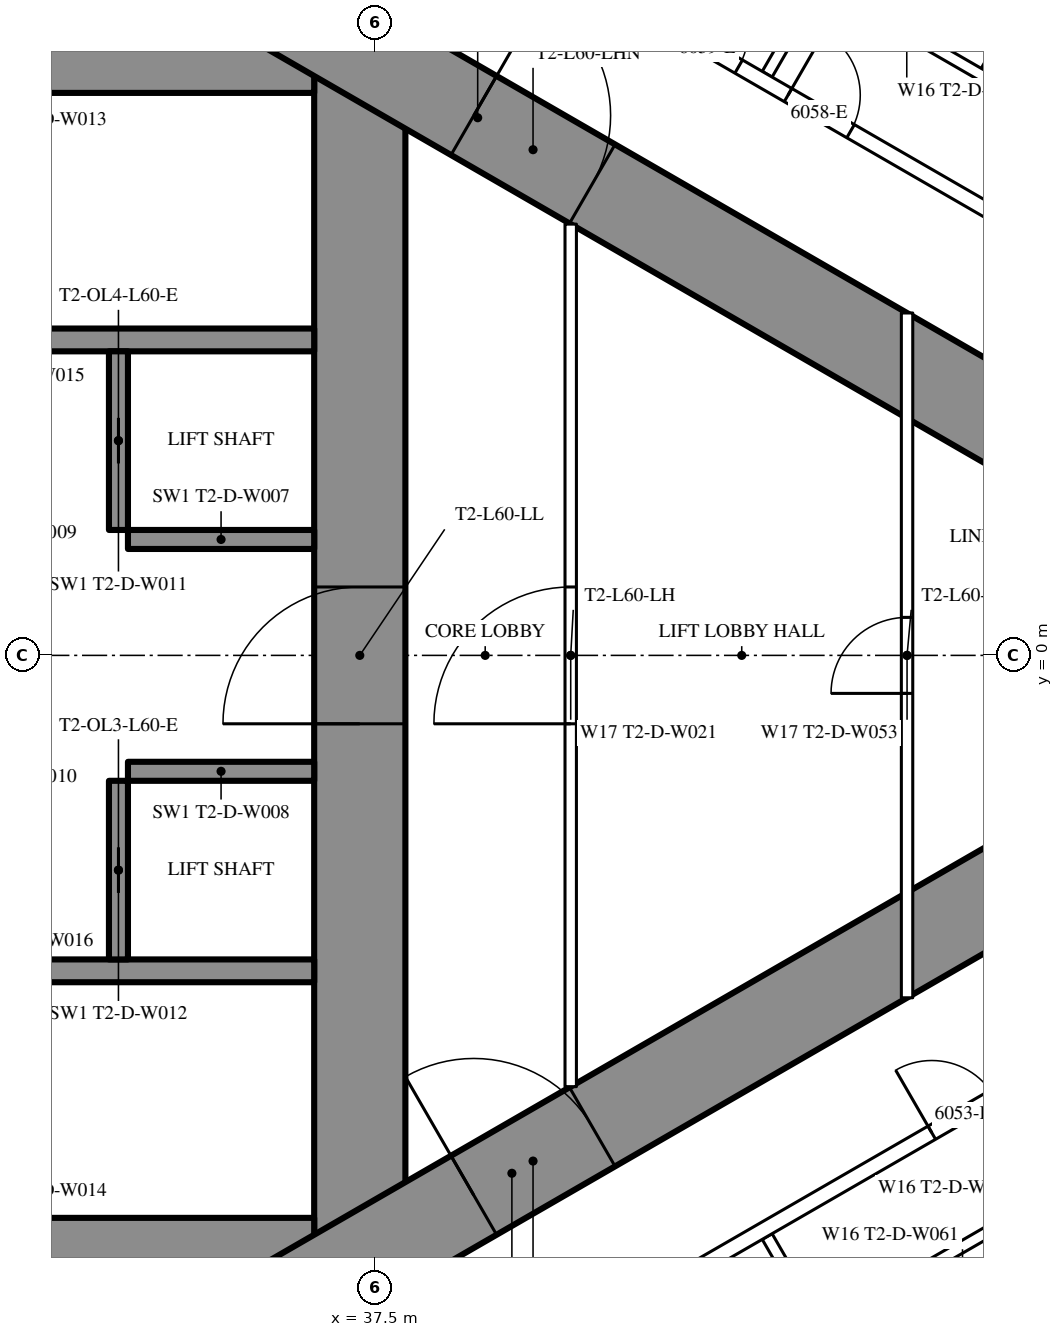
"""IFC4 building model, lengths in metres.
Left out: names, types, materials, properties, quantities, classifications, styles, units other than length and angle.
Written with IfcOpenShell. Run it as: python <this file> out.ifc"""

import sys

from ifc_helpers import new_model, si_unit, direction, frame, frame_2d, origin, place, context, subcontext, project, spatial, rectangle, extrude, element, fill, save


model = new_model("IFC4")
c1 = context("Model", 3, precision=1e-05, world=origin(), true_north=direction((0.0, 1.0)))
c2 = subcontext(c1, "Body", "Model", "MODEL_VIEW")
j1 = project(units=[si_unit("LENGTHUNIT", "METRE"), si_unit("PLANEANGLEUNIT", "RADIAN")], contexts=[c1])
p1 = place(None, origin())
s1 = spatial("IfcSite", under=j1, at=p1, CompositionType="ELEMENT")
p2 = place(p1, origin())
s2 = spatial("IfcBuilding", under=s1, at=p2, CompositionType="ELEMENT")
p3 = place(p2, frame((0.0, 0.0, 226.1)))
s3 = spatial("IfcBuildingStorey", under=s2, at=p3, CompositionType="ELEMENT", Elevation=226.1)
p4 = place(p3, frame((37.3, -8.6, 0.0), z_axis=(0.0, 0.0, 1.0), x_axis=(0.0, 1.0, 0.0)))
e1 = element("IfcWall", 1, at=p4, inside=s3, PredefinedType="SHEAR", context=c2, shape_type="SweptSolid", body=[
    extrude(rectangle(XDim=17.2, YDim=1.2, at=frame_2d((8.6, 0.0))), origin(), (0.0, 0.0, 1.0), 3.6),
])
p5 = place(p4, frame((7.7, 0.0, 0.0)))
e2 = element("IfcOpeningElement", 2, at=p5, cuts=e1, PredefinedType="OPENING", context=c2, shape_type="SweptSolid", body=[
    extrude(rectangle(XDim=1.8, YDim=2.2, at=frame_2d((0.9, 1.1))), frame((0.0, 0.61, 0.0), z_axis=(0.0, -1.0, 0.0), x_axis=(1.0, 0.0, 0.0)), (0.0, 0.0, 1.0), 1.22),
])
p6 = place(p3, frame((28.3, -8.0, 0.0), z_axis=(0.0, 0.0, 1.0), x_axis=(1.0, 0.0, 0.0)))
e3 = element("IfcWall", 3, at=p6, inside=s3, PredefinedType="SHEAR", context=c2, shape_type="SweptSolid", body=[
    extrude(rectangle(XDim=8.4, YDim=1.2, at=frame_2d((4.2, 0.0))), origin(), (0.0, 0.0, 1.0), 3.6),
])
p7 = place(p6, frame((0.25, 0.0, 0.0)))
e4 = element("IfcOpeningElement", 4, at=p7, cuts=e3, PredefinedType="OPENING", context=c2, shape_type="SweptSolid", body=[
    extrude(rectangle(XDim=1.0, YDim=2.2, at=frame_2d((0.5, 1.1))), frame((0.0, 0.61, 0.0), z_axis=(0.0, -1.0, 0.0), x_axis=(1.0, 0.0, 0.0)), (0.0, 0.0, 1.0), 1.22),
])
p8 = place(p3, frame((28.3, 8.0, 0.0), z_axis=(0.0, 0.0, 1.0), x_axis=(1.0, 0.0, 0.0)))
e5 = element("IfcWall", 5, at=p8, inside=s3, PredefinedType="SHEAR", context=c2, shape_type="SweptSolid", body=[
    extrude(rectangle(XDim=8.4, YDim=1.2, at=frame_2d((4.2, 0.0))), origin(), (0.0, 0.0, 1.0), 3.6),
])
p9 = place(p8, frame((0.25, 0.0, 0.0)))
e6 = element("IfcOpeningElement", 6, at=p9, cuts=e5, PredefinedType="OPENING", context=c2, shape_type="SweptSolid", body=[
    extrude(rectangle(XDim=1.0, YDim=2.2, at=frame_2d((0.5, 1.1))), frame((0.0, 0.61, 0.0), z_axis=(0.0, -1.0, 0.0), x_axis=(1.0, 0.0, 0.0)), (0.0, 0.0, 1.0), 1.22),
])
for number, where, z_axis, x_axis in (
    (7, (28.3, -4.15, 0.0), (0.0, 0.0, 1.0), (1.0, 0.0, 0.0)),
    (8, (28.3, 4.15, 0.0), (0.0, 0.0, 1.0), (1.0, 0.0, 0.0)),
):
    element("IfcWall", number, at=place(p3, frame(where, z_axis=z_axis, x_axis=x_axis)), inside=s3, PredefinedType="SHEAR", context=c2, shape_type="SweptSolid", body=[
        extrude(rectangle(XDim=8.4, YDim=0.3, at=frame_2d((4.2, 0.0))), origin(), (0.0, 0.0, 1.0), 3.6),
    ])
p10 = place(p3, frame((34.125, -4.0, 0.0), z_axis=(0.0, 0.0, 1.0), x_axis=(0.0, 1.0, 0.0)))
e9 = element("IfcWall", 9, at=p10, inside=s3, PredefinedType="SHEAR", context=c2, shape_type="SweptSolid", body=[
    extrude(rectangle(XDim=2.35, YDim=0.25, at=frame_2d((1.175, 0.0))), origin(), (0.0, 0.0, 1.0), 3.6),
])
p11 = place(p10, frame((0.875, 0.0, 0.0)))
e10 = element("IfcOpeningElement", 10, at=p11, cuts=e9, PredefinedType="OPENING", context=c2, shape_type="SweptSolid", body=[
    extrude(rectangle(XDim=0.6, YDim=2.0, at=frame_2d((0.3, 1.0))), frame((0.0, 0.135, 0.0), z_axis=(0.0, -1.0, 0.0), x_axis=(1.0, 0.0, 0.0)), (0.0, 0.0, 1.0), 0.27),
])
p12 = place(p3, frame((34.25, -1.525, 0.0), z_axis=(0.0, 0.0, 1.0), x_axis=(1.0, 0.0, 0.0)))
e11 = element("IfcWall", 11, at=p12, inside=s3, PredefinedType="SHEAR", context=c2, shape_type="SweptSolid", body=[
    extrude(rectangle(XDim=2.45, YDim=0.25, at=frame_2d((1.225, 0.0))), origin(), (0.0, 0.0, 1.0), 3.6),
])
p13 = place(p3, frame((34.125, 1.65, 0.0), z_axis=(0.0, 0.0, 1.0), x_axis=(0.0, 1.0, 0.0)))
e12 = element("IfcWall", 12, at=p13, inside=s3, PredefinedType="SHEAR", context=c2, shape_type="SweptSolid", body=[
    extrude(rectangle(XDim=2.35, YDim=0.25, at=frame_2d((1.175, 0.0))), origin(), (0.0, 0.0, 1.0), 3.6),
])
p14 = place(p13, frame((0.875, 0.0, 0.0)))
e13 = element("IfcOpeningElement", 13, at=p14, cuts=e12, PredefinedType="OPENING", context=c2, shape_type="SweptSolid", body=[
    extrude(rectangle(XDim=0.6, YDim=2.0, at=frame_2d((0.3, 1.0))), frame((0.0, 0.135, 0.0), z_axis=(0.0, -1.0, 0.0), x_axis=(1.0, 0.0, 0.0)), (0.0, 0.0, 1.0), 0.27),
])
p15 = place(p3, frame((34.25, 1.525, 0.0), z_axis=(0.0, 0.0, 1.0), x_axis=(1.0, 0.0, 0.0)))
e14 = element("IfcWall", 14, at=p15, inside=s3, PredefinedType="SHEAR", context=c2, shape_type="SweptSolid", body=[
    extrude(rectangle(XDim=2.45, YDim=0.25, at=frame_2d((1.225, 0.0))), origin(), (0.0, 0.0, 1.0), 3.6),
])
p16 = place(p3, frame((27.2, -13.8, 0.0), z_axis=(0.0, 0.0, 1.0), x_axis=(0.866027159892, 0.499996958321, 0.0)))
e15 = element("IfcWall", 15, at=p16, inside=s3, PredefinedType="SHEAR", context=c2, shape_type="SweptSolid", body=[
    extrude(rectangle(XDim=27.947, YDim=1.2, at=frame_2d((13.973, 0.0))), origin(), (0.0, 0.0, 1.0), 3.6),
])
p17 = place(p16, frame((4.6, 0.0, 0.0)))
e16 = element("IfcOpeningElement", 16, at=p17, cuts=e15, PredefinedType="OPENING", context=c2, shape_type="SweptSolid", body=[
    extrude(rectangle(XDim=1.0, YDim=2.2, at=frame_2d((0.5, 1.1))), frame((0.0, 0.61, 0.0), z_axis=(0.0, -1.0, 0.0), x_axis=(1.0, 0.0, 0.0)), (0.0, 0.0, 1.0), 1.22),
])
p18 = place(p16, frame((13.395, 0.0, 0.0)))
e17 = element("IfcOpeningElement", 17, at=p18, cuts=e15, PredefinedType="OPENING", context=c2, shape_type="SweptSolid", body=[
    extrude(rectangle(XDim=1.8, YDim=2.2, at=frame_2d((0.9, 1.1))), frame((0.0, 0.61, 0.0), z_axis=(0.0, -1.0, 0.0), x_axis=(1.0, 0.0, 0.0)), (0.0, 0.0, 1.0), 1.22),
])
p19 = place(p3, frame((27.2, 13.8, 0.0), z_axis=(0.0, 0.0, 1.0), x_axis=(0.866024515034, -0.500001539357, 0.0)))
e18 = element("IfcWall", 18, at=p19, inside=s3, PredefinedType="SHEAR", context=c2, shape_type="SweptSolid", body=[
    extrude(rectangle(XDim=26.907, YDim=1.2, at=frame_2d((13.454, 0.0))), origin(), (0.0, 0.0, 1.0), 3.6),
])
p20 = place(p19, frame((4.6, 0.0, 0.0)))
e19 = element("IfcOpeningElement", 19, at=p20, cuts=e18, PredefinedType="OPENING", context=c2, shape_type="SweptSolid", body=[
    extrude(rectangle(XDim=1.0, YDim=2.2, at=frame_2d((0.5, 1.1))), frame((0.0, 0.61, 0.0), z_axis=(0.0, -1.0, 0.0), x_axis=(1.0, 0.0, 0.0)), (0.0, 0.0, 1.0), 1.22),
])
p21 = place(p19, frame((13.395, 0.0, 0.0)))
e20 = element("IfcOpeningElement", 20, at=p21, cuts=e18, PredefinedType="OPENING", context=c2, shape_type="SweptSolid", body=[
    extrude(rectangle(XDim=1.8, YDim=2.2, at=frame_2d((0.9, 1.1))), frame((0.0, 0.61, 0.0), z_axis=(0.0, -1.0, 0.0), x_axis=(1.0, 0.0, 0.0)), (0.0, 0.0, 1.0), 1.22),
])
for number, where, z_axis, x_axis in (
    (21, (42.66, -7.646, 0.0), (0.0, 0.0, 1.0), (0.5, -0.866, 0.0)),
    (22, (42.66, 7.646, 0.0), (0.0, 0.0, 1.0), (0.5, 0.866, 0.0)),
):
    element("IfcWall", number, at=place(p3, frame(where, z_axis=z_axis, x_axis=x_axis)), inside=s3, PredefinedType="PARTITIONING", context=c2, shape_type="SweptSolid", body=[
        extrude(rectangle(XDim=6.398, YDim=0.15, at=frame_2d((3.199, 0.0))), origin(), (0.0, 0.0, 1.0), 2.45),
    ])
p22 = place(p3, frame((28.959, 15.44, 0.0), z_axis=(0.0, 0.0, 1.0), x_axis=(0.866028936079, -0.499993881836, 0.0)))
e23 = element("IfcWall", 23, at=p22, inside=s3, PredefinedType="PARTITIONING", context=c2, shape_type="SweptSolid", body=[
    extrude(rectangle(XDim=20.503, YDim=0.2, at=frame_2d((10.251, 0.0))), origin(), (0.0, 0.0, 1.0), 3.35),
])
p23 = place(p22, frame((16.137, 0.0, 0.0)))
e24 = element("IfcOpeningElement", 24, at=p23, cuts=e23, PredefinedType="OPENING", context=c2, shape_type="SweptSolid", body=[
    extrude(rectangle(XDim=0.95, YDim=2.2, at=frame_2d((0.475, 1.1))), frame((0.0, 0.11, 0.0), z_axis=(0.0, -1.0, 0.0), x_axis=(1.0, 0.0, 0.0)), (0.0, 0.0, 1.0), 0.22),
])
p24 = place(p22, frame((14.437, 0.0, 0.0)))
e25 = element("IfcOpeningElement", 25, at=p24, cuts=e23, PredefinedType="OPENING", context=c2, shape_type="SweptSolid", body=[
    extrude(rectangle(XDim=0.95, YDim=2.2, at=frame_2d((0.475, 1.1))), frame((0.0, 0.11, 0.0), z_axis=(0.0, -1.0, 0.0), x_axis=(1.0, 0.0, 0.0)), (0.0, 0.0, 1.0), 0.22),
])
p25 = place(p22, frame((2.244, 0.0, 0.0)))
e26 = element("IfcOpeningElement", 26, at=p25, cuts=e23, PredefinedType="OPENING", context=c2, shape_type="SweptSolid", body=[
    extrude(rectangle(XDim=1.8, YDim=2.04, at=frame_2d((0.9, 1.02))), frame((0.0, 0.11, 0.0), z_axis=(0.0, -1.0, 0.0), x_axis=(1.0, 0.0, 0.0)), (0.0, 0.0, 1.0), 0.22),
])
p26 = place(p3, frame((44.514, -8.191, 0.0), z_axis=(0.0, 0.0, 1.0), x_axis=(0.866031185235, 0.4999899861, 0.0)))
e27 = element("IfcWall", 27, at=p26, inside=s3, PredefinedType="PARTITIONING", context=c2, shape_type="SweptSolid", body=[
    extrude(rectangle(XDim=2.475, YDim=0.15, at=frame_2d((1.238, 0.0))), origin(), (0.0, 0.0, 1.0), 3.35),
])
p27 = place(p3, frame((45.503, 7.621, 0.0), z_axis=(0.0, 0.0, 1.0), x_axis=(0.500006934395, 0.866021400173, 0.0)))
e28 = element("IfcWall", 28, at=p27, inside=s3, PredefinedType="PARTITIONING", context=c2, shape_type="SweptSolid", body=[
    extrude(rectangle(XDim=2.6, YDim=0.15, at=frame_2d((1.3, 0.0))), origin(), (0.0, 0.0, 1.0), 3.35),
])
p28 = place(p27, frame((0.9, 0.0, 0.0)))
e29 = element("IfcOpeningElement", 29, at=p28, cuts=e28, PredefinedType="OPENING", context=c2, shape_type="SweptSolid", body=[
    extrude(rectangle(XDim=0.8, YDim=2.2, at=frame_2d((0.4, 1.1))), frame((0.0, 0.085, 0.0), z_axis=(0.0, -1.0, 0.0), x_axis=(1.0, 0.0, 0.0)), (0.0, 0.0, 1.0), 0.17),
])
p29 = place(p3, frame((43.425, 8.821, 0.0), z_axis=(0.0, 0.0, 1.0), x_axis=(0.866006523861, -0.500032699561, 0.0)))
e30 = element("IfcWall", 30, at=p29, inside=s3, PredefinedType="PARTITIONING", context=c2, shape_type="SweptSolid", body=[
    extrude(rectangle(XDim=2.475, YDim=0.15, at=frame_2d((1.237, 0.0))), origin(), (0.0, 0.0, 1.0), 2.5),
])
p30 = place(p3, frame((28.959, -15.44, 0.0), z_axis=(0.0, 0.0, 1.0), x_axis=(0.866025204199, 0.500000345692, 0.0)))
e31 = element("IfcWall", 31, at=p30, inside=s3, PredefinedType="PARTITIONING", context=c2, shape_type="SweptSolid", body=[
    extrude(rectangle(XDim=19.646, YDim=0.2, at=frame_2d((9.823, 0.0))), origin(), (0.0, 0.0, 1.0), 3.35),
])
p31 = place(p30, frame((1.494, 0.0, 0.0)))
e32 = element("IfcOpeningElement", 32, at=p31, cuts=e31, PredefinedType="OPENING", context=c2, shape_type="SweptSolid", body=[
    extrude(rectangle(XDim=1.8, YDim=2.04, at=frame_2d((0.9, 1.02))), frame((0.0, 0.11, 0.0), z_axis=(0.0, -1.0, 0.0), x_axis=(1.0, 0.0, 0.0)), (0.0, 0.0, 1.0), 0.22),
])
p32 = place(p30, frame((7.687, 0.0, 0.0)))
e33 = element("IfcOpeningElement", 33, at=p32, cuts=e31, PredefinedType="OPENING", context=c2, shape_type="SweptSolid", body=[
    extrude(rectangle(XDim=1.0, YDim=2.2, at=frame_2d((0.5, 1.1))), frame((0.0, 0.11, 0.0), z_axis=(0.0, -1.0, 0.0), x_axis=(1.0, 0.0, 0.0)), (0.0, 0.0, 1.0), 0.22),
])
p33 = place(p30, frame((18.321, 0.0, 0.0)))
e34 = element("IfcOpeningElement", 34, at=p33, cuts=e31, PredefinedType="OPENING", context=c2, shape_type="SweptSolid", body=[
    extrude(rectangle(XDim=0.95, YDim=2.2, at=frame_2d((0.475, 1.1))), frame((0.0, 0.11, 0.0), z_axis=(0.0, -1.0, 0.0), x_axis=(1.0, 0.0, 0.0)), (0.0, 0.0, 1.0), 0.22),
])
p34 = place(p3, frame((40.075, -5.674, 0.0), z_axis=(0.0, 0.0, 1.0), x_axis=(0.0, 1.0, 0.0)))
e35 = element("IfcWall", 35, at=p34, inside=s3, PredefinedType="PARTITIONING", context=c2, shape_type="SweptSolid", body=[
    extrude(rectangle(XDim=11.348, YDim=0.15, at=frame_2d((5.674, 0.0))), origin(), (0.0, 0.0, 1.0), 3.35),
])
p35 = place(p34, frame((4.774, 0.0, 0.0)))
e36 = element("IfcOpeningElement", 36, at=p35, cuts=e35, PredefinedType="OPENING", context=c2, shape_type="SweptSolid", body=[
    extrude(rectangle(XDim=1.8, YDim=2.2, at=frame_2d((0.9, 1.1))), frame((0.0, 0.085, 0.0), z_axis=(0.0, -1.0, 0.0), x_axis=(1.0, 0.0, 0.0)), (0.0, 0.0, 1.0), 0.17),
])
p36 = place(p3, frame((44.5, -4.505, 0.0), z_axis=(0.0, 0.0, 1.0), x_axis=(0.0, 1.0, 0.0)))
e37 = element("IfcWall", 37, at=p36, inside=s3, PredefinedType="PARTITIONING", context=c2, shape_type="SweptSolid", body=[
    extrude(rectangle(XDim=9.009, YDim=0.15, at=frame_2d((4.505, 0.0))), origin(), (0.0, 0.0, 1.0), 3.35),
])
p37 = place(p36, frame((4.005, 0.0, 0.0)))
e38 = element("IfcOpeningElement", 38, at=p37, cuts=e37, PredefinedType="OPENING", context=c2, shape_type="SweptSolid", body=[
    extrude(rectangle(XDim=1.0, YDim=2.2, at=frame_2d((0.5, 1.1))), frame((0.0, 0.085, 0.0), z_axis=(0.0, -1.0, 0.0), x_axis=(1.0, 0.0, 0.0)), (0.0, 0.0, 1.0), 0.17),
])
p38 = place(p33, origin())
e39 = element("IfcDoor", 39, at=p38, inside=s3, OperationType="SINGLE_SWING_LEFT", PredefinedType="DOOR", context=c2, shape_type="SweptSolid", body=[
    extrude(rectangle(XDim=0.95, YDim=2.2, at=frame_2d((0.475, 1.1))), frame((0.0, 0.025, 0.0), z_axis=(0.0, -1.0, 0.0), x_axis=(1.0, 0.0, 0.0)), (0.0, 0.0, 1.0), 0.05),
])
fill(e34, e39)
p39 = place(p23, origin())
e40 = element("IfcDoor", 40, at=p39, inside=s3, OperationType="SINGLE_SWING_LEFT", PredefinedType="DOOR", context=c2, shape_type="SweptSolid", body=[
    extrude(rectangle(XDim=0.95, YDim=2.2, at=frame_2d((0.475, 1.1))), frame((0.0, 0.025, 0.0), z_axis=(0.0, -1.0, 0.0), x_axis=(1.0, 0.0, 0.0)), (0.0, 0.0, 1.0), 0.05),
])
fill(e24, e40)
p40 = place(p24, origin())
e41 = element("IfcDoor", 41, at=p40, inside=s3, OperationType="SINGLE_SWING_LEFT", PredefinedType="DOOR", context=c2, shape_type="SweptSolid", body=[
    extrude(rectangle(XDim=0.95, YDim=2.2, at=frame_2d((0.475, 1.1))), frame((0.0, 0.025, 0.0), z_axis=(0.0, -1.0, 0.0), x_axis=(1.0, 0.0, 0.0)), (0.0, 0.0, 1.0), 0.05),
])
fill(e25, e41)
p41 = place(p35, origin())
e42 = element("IfcDoor", 42, at=p41, inside=s3, OperationType="DOUBLE_DOOR_SINGLE_SWING", PredefinedType="DOOR", context=c2, shape_type="SweptSolid", body=[
    extrude(rectangle(XDim=1.8, YDim=2.2, at=frame_2d((0.9, 1.1))), frame((0.0, 0.025, 0.0), z_axis=(0.0, -1.0, 0.0), x_axis=(1.0, 0.0, 0.0)), (0.0, 0.0, 1.0), 0.05),
])
fill(e36, e42)
p42 = place(p37, origin())
e43 = element("IfcDoor", 43, at=p42, inside=s3, OperationType="SINGLE_SWING_LEFT", PredefinedType="DOOR", context=c2, shape_type="SweptSolid", body=[
    extrude(rectangle(XDim=1.0, YDim=2.2, at=frame_2d((0.5, 1.1))), frame((0.0, 0.025, 0.0), z_axis=(0.0, -1.0, 0.0), x_axis=(1.0, 0.0, 0.0)), (0.0, 0.0, 1.0), 0.05),
])
fill(e38, e43)
p43 = place(p18, origin())
e44 = element("IfcDoor", 44, at=p43, inside=s3, OperationType="DOUBLE_DOOR_SINGLE_SWING", PredefinedType="DOOR", context=c2, shape_type="SweptSolid", body=[
    extrude(rectangle(XDim=1.8, YDim=2.2, at=frame_2d((0.9, 1.1))), frame((0.0, 0.025, 0.0), z_axis=(0.0, -1.0, 0.0), x_axis=(1.0, 0.0, 0.0)), (0.0, 0.0, 1.0), 0.05),
])
fill(e17, e44)
p44 = place(p21, origin())
e45 = element("IfcDoor", 45, at=p44, inside=s3, OperationType="DOUBLE_DOOR_SINGLE_SWING", PredefinedType="DOOR", context=c2, shape_type="SweptSolid", body=[
    extrude(rectangle(XDim=1.8, YDim=2.2, at=frame_2d((0.9, 1.1))), frame((0.0, 0.025, 0.0), z_axis=(0.0, -1.0, 0.0), x_axis=(1.0, 0.0, 0.0)), (0.0, 0.0, 1.0), 0.05),
])
fill(e20, e45)
p45 = place(p5, origin())
e46 = element("IfcDoor", 46, at=p45, inside=s3, OperationType="DOUBLE_DOOR_SINGLE_SWING", PredefinedType="DOOR", context=c2, shape_type="SweptSolid", body=[
    extrude(rectangle(XDim=1.8, YDim=2.2, at=frame_2d((0.9, 1.1))), frame((0.0, 0.025, 0.0), z_axis=(0.0, -1.0, 0.0), x_axis=(1.0, 0.0, 0.0)), (0.0, 0.0, 1.0), 0.05),
])
fill(e2, e46)
p46 = place(p11, origin())
e47 = element("IfcDoor", 47, at=p46, inside=s3, OperationType="SLIDING_TO_LEFT", PredefinedType="DOOR", context=c2, shape_type="SweptSolid", body=[
    extrude(rectangle(XDim=0.6, YDim=2.0, at=frame_2d((0.3, 1.0))), frame((0.0, 0.025, 0.0), z_axis=(0.0, -1.0, 0.0), x_axis=(1.0, 0.0, 0.0)), (0.0, 0.0, 1.0), 0.05),
])
fill(e10, e47)
p47 = place(p14, origin())
e48 = element("IfcDoor", 48, at=p47, inside=s3, OperationType="SLIDING_TO_LEFT", PredefinedType="DOOR", context=c2, shape_type="SweptSolid", body=[
    extrude(rectangle(XDim=0.6, YDim=2.0, at=frame_2d((0.3, 1.0))), frame((0.0, 0.025, 0.0), z_axis=(0.0, -1.0, 0.0), x_axis=(1.0, 0.0, 0.0)), (0.0, 0.0, 1.0), 0.05),
])
fill(e13, e48)
save(model, sys.argv[1])
